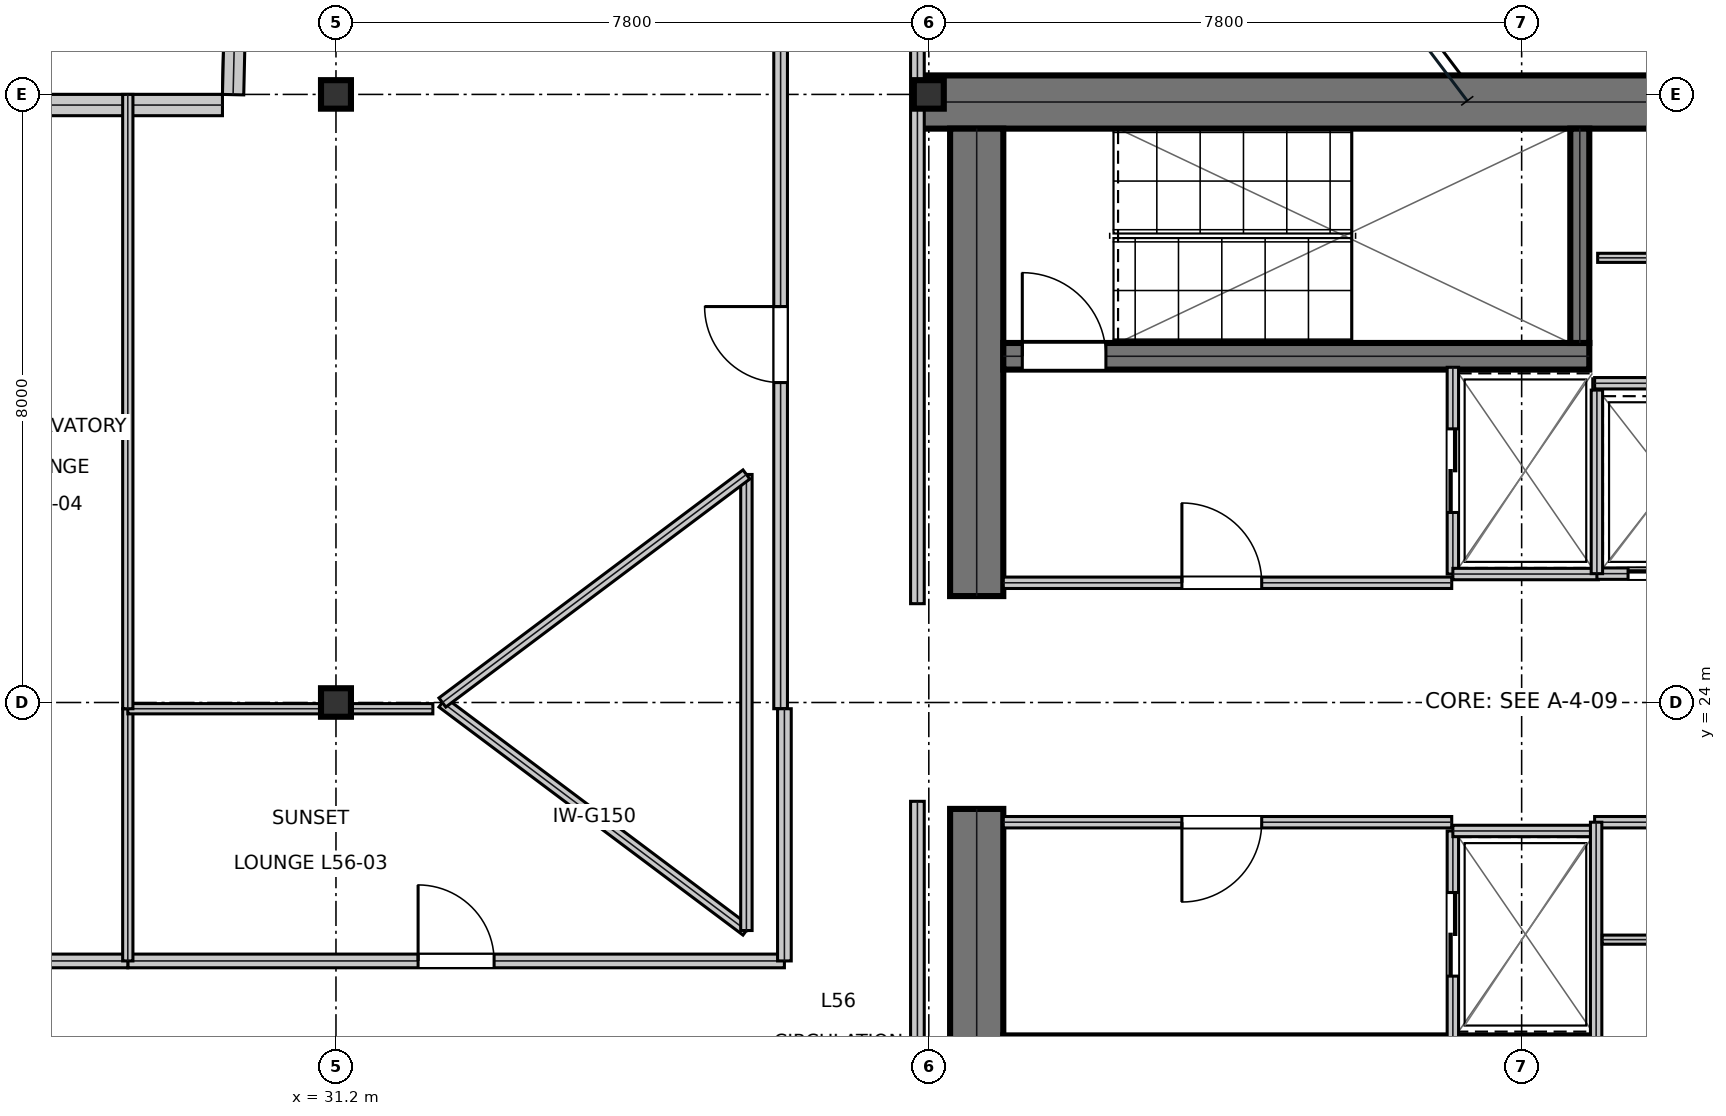
"""IFC4 building model, lengths in metres.
Left out: names, types, materials, properties, quantities, classifications, styles, units other than length and angle.
Written with IfcOpenShell. Run it as: python <this file> out.ifc"""

import sys

from ifc_helpers import new_model, si_unit, direction, frame, frame_2d, origin, origin_2d, place, context, subcontext, project, spatial, rectangle, i_section, extrude, element, fill, save


model = new_model("IFC4")
c1 = context("Model", 3, precision=1e-05, world=origin(), true_north=direction((0.0, 1.0)))
c2 = subcontext(c1, "Body", "Model", "MODEL_VIEW")
j1 = project(units=[si_unit("LENGTHUNIT", "METRE"), si_unit("PLANEANGLEUNIT", "RADIAN")], contexts=[c1])
p1 = place(None, origin())
s1 = spatial("IfcSite", under=j1, at=p1, CompositionType="ELEMENT")
p2 = place(p1, origin())
s2 = spatial("IfcBuilding", under=s1, at=p2, CompositionType="ELEMENT")
p3 = place(p2, frame((0.0, 0.0, 240.45)))
s3 = spatial("IfcBuildingStorey", under=s2, at=p3, CompositionType="ELEMENT", Elevation=240.45)
p4 = place(p3, frame((38.8, 31.9, 0.0), z_axis=(0.0, 0.0, 1.0), x_axis=(1.0, 0.0, 0.0)))
e1 = element("IfcWall", 1, at=p4, inside=s3, PredefinedType="SHEAR", context=c2, shape_type="SweptSolid", body=[
    extrude(rectangle(XDim=16.0, YDim=0.7, at=frame_2d((8.0, 0.0))), origin(), (0.0, 0.0, 1.0), 3.79),
])
for number, where, z_axis, x_axis in (
    (2, (39.63, 16.45, 0.0), (0.0, 0.0, 1.0), (0.0, 1.0, 0.0)),
    (3, (39.63, 25.4, 0.0), (0.0, 0.0, 1.0), (0.0, 1.0, 0.0)),
):
    element("IfcWall", number, at=place(p3, frame(where, z_axis=z_axis, x_axis=x_axis)), inside=s3, PredefinedType="SHEAR", context=c2, shape_type="SweptSolid", body=[
        extrude(rectangle(XDim=6.15, YDim=0.7, at=frame_2d((3.075, 0.0))), origin(), (0.0, 0.0, 1.0), 3.79),
    ])
p5 = place(p3, frame((39.98, 28.555, 0.0), z_axis=(0.0, 0.0, 1.0), x_axis=(1.0, 0.0, 0.0)))
e4 = element("IfcWall", 4, at=p5, inside=s3, PredefinedType="SHEAR", context=c2, shape_type="SweptSolid", body=[
    extrude(rectangle(XDim=7.71, YDim=0.35, at=frame_2d((3.855, 0.0))), origin(), (0.0, 0.0, 1.0), 3.79),
])
p6 = place(p5, frame((0.25, 0.0, 0.0)))
e5 = element("IfcOpeningElement", 5, at=p6, cuts=e4, PredefinedType="OPENING", context=c2, shape_type="SweptSolid", body=[
    extrude(rectangle(XDim=1.1, YDim=2.15, at=frame_2d((0.55, 1.075))), frame((0.0, 0.185, 0.0), z_axis=(0.0, -1.0, 0.0), x_axis=(1.0, 0.0, 0.0)), (0.0, 0.0, 1.0), 0.37),
])
p7 = place(p3, frame((39.98, 19.445, 0.0), z_axis=(0.0, 0.0, 1.0), x_axis=(1.0, 0.0, 0.0)))
e6 = element("IfcWall", 6, at=p7, inside=s3, PredefinedType="SHEAR", context=c2, shape_type="SweptSolid", body=[
    extrude(rectangle(XDim=7.71, YDim=0.35, at=frame_2d((3.855, 0.0))), origin(), (0.0, 0.0, 1.0), 3.79),
])
p8 = place(p7, frame((0.25, 0.0, 0.0)))
e7 = element("IfcOpeningElement", 7, at=p8, cuts=e6, PredefinedType="OPENING", context=c2, shape_type="SweptSolid", body=[
    extrude(rectangle(XDim=1.1, YDim=2.15, at=frame_2d((0.55, 1.075))), frame((0.0, 0.185, 0.0), z_axis=(0.0, -1.0, 0.0), x_axis=(1.0, 0.0, 0.0)), (0.0, 0.0, 1.0), 0.37),
])
p9 = place(p3, frame((47.565, 28.73, 0.0), z_axis=(0.0, 0.0, 1.0), x_axis=(0.0, 1.0, 0.0)))
e8 = element("IfcWall", 8, at=p9, inside=s3, PredefinedType="SHEAR", context=c2, shape_type="SweptSolid", body=[
    extrude(rectangle(XDim=2.82, YDim=0.25, at=frame_2d((1.41, 0.0))), origin(), (0.0, 0.0, 1.0), 3.79),
])
for number, where, z_axis, x_axis in (
    (9, (31.2, 24.0, 0.0), (0.0, 0.0, 1.0), (1.0, 0.0, 0.0)),
    (10, (31.2, 32.0, 0.0), (0.0, 0.0, 1.0), (1.0, 0.0, 0.0)),
    (11, (39.0, 32.0, 0.0), (0.0, 0.0, 1.0), (1.0, 0.0, 0.0)),
):
    element("IfcColumn", number, at=place(p3, frame(where, z_axis=z_axis, x_axis=x_axis)), inside=s3, PredefinedType="COLUMN", context=c2, shape_type="SweptSolid", body=[
        extrude(i_section(OverallWidth=0.394, OverallDepth=0.375, WebThickness=0.017, FlangeThickness=0.028, at=origin_2d()), origin(), (0.0, 0.0, 1.0), 4.044),
    ])
p10 = place(p3, frame((30.007, 38.938, 0.0), z_axis=(0.0, 0.0, 1.0), x_axis=(-0.023173514979, -0.999731458044, 0.0)))
e12 = element("IfcWall", 12, at=p10, inside=s3, PredefinedType="STANDARD", context=c2, shape_type="SweptSolid", body=[
    extrude(rectangle(XDim=6.943, YDim=0.28, at=frame_2d((3.471, 0.0))), origin(), (0.0, 0.0, 1.0), 3.79),
])
p11 = place(p3, frame((29.707, 31.86, 0.0), z_axis=(0.0, 0.0, 1.0), x_axis=(-1.0, 0.0, 0.0)))
e13 = element("IfcWall", 13, at=p11, inside=s3, PredefinedType="STANDARD", context=c2, shape_type="SweptSolid", body=[
    extrude(rectangle(XDim=2.819, YDim=0.28, at=frame_2d((1.409, 0.0))), origin(), (0.0, 0.0, 1.0), 3.79),
])
p12 = place(p3, frame((39.98, 25.575, 0.0), z_axis=(0.0, 0.0, 1.0), x_axis=(1.0, 0.0, 0.0)))
e14 = element("IfcWall", 14, at=p12, inside=s3, PredefinedType="PARTITIONING", context=c2, shape_type="SweptSolid", body=[
    extrude(rectangle(XDim=5.9, YDim=0.15, at=frame_2d((2.95, 0.0))), origin(), (0.0, 0.0, 1.0), 3.79),
])
p13 = place(p12, frame((2.35, 0.0, 0.0)))
e15 = element("IfcOpeningElement", 15, at=p13, cuts=e14, PredefinedType="OPENING", context=c2, shape_type="SweptSolid", body=[
    extrude(rectangle(XDim=1.05, YDim=2.15, at=frame_2d((0.525, 1.075))), frame((0.0, 0.085, 0.0), z_axis=(0.0, -1.0, 0.0), x_axis=(1.0, 0.0, 0.0)), (0.0, 0.0, 1.0), 0.17),
])
p14 = place(p3, frame((39.98, 22.425, 0.0), z_axis=(0.0, 0.0, 1.0), x_axis=(1.0, 0.0, 0.0)))
e16 = element("IfcWall", 16, at=p14, inside=s3, PredefinedType="PARTITIONING", context=c2, shape_type="SweptSolid", body=[
    extrude(rectangle(XDim=5.9, YDim=0.15, at=frame_2d((2.95, 0.0))), origin(), (0.0, 0.0, 1.0), 3.79),
])
p15 = place(p14, frame((2.35, 0.0, 0.0)))
e17 = element("IfcOpeningElement", 17, at=p15, cuts=e16, PredefinedType="OPENING", context=c2, shape_type="SweptSolid", body=[
    extrude(rectangle(XDim=1.05, YDim=2.15, at=frame_2d((0.525, 1.075))), frame((0.0, 0.085, 0.0), z_axis=(0.0, -1.0, 0.0), x_axis=(1.0, 0.0, 0.0)), (0.0, 0.0, 1.0), 0.17),
])
p16 = place(p3, frame((45.895, 25.69, 0.0), z_axis=(0.0, 0.0, 1.0), x_axis=(0.0, 1.0, 0.0)))
e18 = element("IfcWall", 18, at=p16, inside=s3, PredefinedType="PARTITIONING", context=c2, shape_type="SweptSolid", body=[
    extrude(rectangle(XDim=2.72, YDim=0.15, at=frame_2d((1.36, 0.0))), origin(), (0.0, 0.0, 1.0), 3.79),
])
p17 = place(p16, frame((0.81, 0.0, 0.0)))
e19 = element("IfcOpeningElement", 19, at=p17, cuts=e18, PredefinedType="OPENING", context=c2, shape_type="SweptSolid", body=[
    extrude(rectangle(XDim=1.1, YDim=2.15, at=frame_2d((0.55, 1.075))), frame((0.0, 0.085, 0.0), z_axis=(0.0, -1.0, 0.0), x_axis=(1.0, 0.0, 0.0)), (0.0, 0.0, 1.0), 0.17),
])
p18 = place(p3, frame((45.895, 25.69, 0.0), z_axis=(0.0, 0.0, 1.0), x_axis=(1.0, 0.0, 0.0)))
e20 = element("IfcWall", 20, at=p18, inside=s3, PredefinedType="PARTITIONING", context=c2, shape_type="SweptSolid", body=[
    extrude(rectangle(XDim=1.915, YDim=0.15, at=frame_2d((0.958, 0.0))), origin(), (0.0, 0.0, 1.0), 3.79),
])
p19 = place(p3, frame((45.895, 19.59, 0.0), z_axis=(0.0, 0.0, 1.0), x_axis=(0.0, 1.0, 0.0)))
e21 = element("IfcWall", 21, at=p19, inside=s3, PredefinedType="PARTITIONING", context=c2, shape_type="SweptSolid", body=[
    extrude(rectangle(XDim=2.72, YDim=0.15, at=frame_2d((1.36, 0.0))), origin(), (0.0, 0.0, 1.0), 3.79),
])
p20 = place(p19, frame((0.81, 0.0, 0.0)))
e22 = element("IfcOpeningElement", 22, at=p20, cuts=e21, PredefinedType="OPENING", context=c2, shape_type="SweptSolid", body=[
    extrude(rectangle(XDim=1.1, YDim=2.15, at=frame_2d((0.55, 1.075))), frame((0.0, 0.085, 0.0), z_axis=(0.0, -1.0, 0.0), x_axis=(1.0, 0.0, 0.0)), (0.0, 0.0, 1.0), 0.17),
])
p21 = place(p3, frame((45.895, 22.31, 0.0), z_axis=(0.0, 0.0, 1.0), x_axis=(1.0, 0.0, 0.0)))
e23 = element("IfcWall", 23, at=p21, inside=s3, PredefinedType="PARTITIONING", context=c2, shape_type="SweptSolid", body=[
    extrude(rectangle(XDim=1.915, YDim=0.15, at=frame_2d((0.958, 0.0))), origin(), (0.0, 0.0, 1.0), 3.79),
])
p22 = place(p3, frame((47.79, 25.695, 0.0), z_axis=(0.0, 0.0, 1.0), x_axis=(1.0, 0.0, 0.0)))
e24 = element("IfcWall", 24, at=p22, inside=s3, PredefinedType="PARTITIONING", context=c2, shape_type="SweptSolid", body=[
    extrude(rectangle(XDim=1.92, YDim=0.15, at=frame_2d((0.96, 0.0))), origin(), (0.0, 0.0, 1.0), 3.79),
])
p23 = place(p22, frame((0.41, 0.0, 0.0)))
e25 = element("IfcOpeningElement", 25, at=p23, cuts=e24, PredefinedType="OPENING", context=c2, shape_type="SweptSolid", body=[
    extrude(rectangle(XDim=1.1, YDim=2.15, at=frame_2d((0.55, 1.075))), frame((0.0, 0.085, 0.0), z_axis=(0.0, -1.0, 0.0), x_axis=(1.0, 0.0, 0.0)), (0.0, 0.0, 1.0), 0.17),
])
p24 = place(p3, frame((47.79, 25.695, 0.0), z_axis=(0.0, 0.0, 1.0), x_axis=(0.0, 1.0, 0.0)))
e26 = element("IfcWall", 26, at=p24, inside=s3, PredefinedType="PARTITIONING", context=c2, shape_type="SweptSolid", body=[
    extrude(rectangle(XDim=2.415, YDim=0.15, at=frame_2d((1.208, 0.0))), origin(), (0.0, 0.0, 1.0), 3.79),
])
p25 = place(p3, frame((47.76, 22.425, 0.0), z_axis=(0.0, 0.0, 1.0), x_axis=(1.0, 0.0, 0.0)))
e27 = element("IfcWall", 27, at=p25, inside=s3, PredefinedType="PARTITIONING", context=c2, shape_type="SweptSolid", body=[
    extrude(rectangle(XDim=1.96, YDim=0.15, at=frame_2d((0.98, 0.0))), origin(), (0.0, 0.0, 1.0), 3.79),
])
p26 = place(p3, frame((47.78, 16.45, 0.0), z_axis=(0.0, 0.0, 1.0), x_axis=(0.0, 1.0, 0.0)))
e28 = element("IfcWall", 28, at=p26, inside=s3, PredefinedType="PARTITIONING", context=c2, shape_type="SweptSolid", body=[
    extrude(rectangle(XDim=5.975, YDim=0.15, at=frame_2d((2.988, 0.0))), origin(), (0.0, 0.0, 1.0), 3.79),
])
p27 = place(p3, frame((47.86, 20.88, 0.0), z_axis=(0.0, 0.0, 1.0), x_axis=(1.0, 0.0, 0.0)))
e29 = element("IfcWall", 29, at=p27, inside=s3, PredefinedType="PARTITIONING", context=c2, shape_type="SweptSolid", body=[
    extrude(rectangle(XDim=1.76, YDim=0.12, at=frame_2d((0.88, 0.0))), origin(), (0.0, 0.0, 1.0), 3.79),
])
p28 = place(p3, frame((47.76, 28.2, 0.0), z_axis=(0.0, 0.0, 1.0), x_axis=(1.0, 0.0, 0.0)))
e30 = element("IfcWall", 30, at=p28, inside=s3, PredefinedType="PARTITIONING", context=c2, shape_type="SweptSolid", body=[
    extrude(rectangle(XDim=2.04, YDim=0.15, at=frame_2d((1.02, 0.0))), origin(), (0.0, 0.0, 1.0), 3.79),
])
p29 = place(p3, frame((47.8, 29.85, 0.0), z_axis=(0.0, 0.0, 1.0), x_axis=(1.0, 0.0, 0.0)))
e31 = element("IfcWall", 31, at=p29, inside=s3, PredefinedType="PARTITIONING", context=c2, shape_type="SweptSolid", body=[
    extrude(rectangle(XDim=5.86, YDim=0.12, at=frame_2d((2.93, 0.0))), origin(), (0.0, 0.0, 1.0), 3.79),
])
p30 = place(p29, frame((2.6, 0.0, 0.0)))
e32 = element("IfcOpeningElement", 32, at=p30, cuts=e31, PredefinedType="OPENING", context=c2, shape_type="SweptSolid", body=[
    extrude(rectangle(XDim=0.85, YDim=2.15, at=frame_2d((0.425, 1.075))), frame((0.0, 0.07, 0.0), z_axis=(0.0, -1.0, 0.0), x_axis=(1.0, 0.0, 0.0)), (0.0, 0.0, 1.0), 0.14),
])
p31 = place(p3, frame((28.461, 20.6, 0.0), z_axis=(0.0, 0.0, 1.0), x_axis=(1.0, 0.0, 0.0)))
e33 = element("IfcWall", 33, at=p31, inside=s3, PredefinedType="SOLIDWALL", context=c2, shape_type="SweptSolid", body=[
    extrude(rectangle(XDim=8.639, YDim=0.18, at=frame_2d((4.32, 0.0))), origin(), (0.0, 0.0, 1.0), 3.241),
])
p32 = place(p31, frame((3.82, 0.0, 0.0)))
e34 = element("IfcOpeningElement", 34, at=p32, cuts=e33, PredefinedType="OPENING", context=c2, shape_type="SweptSolid", body=[
    extrude(rectangle(XDim=1.0, YDim=2.15, at=frame_2d((0.5, 1.075))), frame((0.0, 0.1, 0.0), z_axis=(0.0, -1.0, 0.0), x_axis=(1.0, 0.0, 0.0)), (0.0, 0.0, 1.0), 0.2),
])
p33 = place(p3, frame((37.05, 23.918, 0.0), z_axis=(0.0, 0.0, 1.0), x_axis=(0.0, 1.0, 0.0)))
e35 = element("IfcWall", 35, at=p33, inside=s3, PredefinedType="SOLIDWALL", context=c2, shape_type="SweptSolid", body=[
    extrude(rectangle(XDim=9.582, YDim=0.18, at=frame_2d((4.791, 0.0))), origin(), (0.0, 0.0, 1.0), 3.241),
])
p34 = place(p33, frame((4.291, 0.0, 0.0)))
e36 = element("IfcOpeningElement", 36, at=p34, cuts=e35, PredefinedType="OPENING", context=c2, shape_type="SweptSolid", body=[
    extrude(rectangle(XDim=1.0, YDim=2.15, at=frame_2d((0.5, 1.075))), frame((0.0, 0.1, 0.0), z_axis=(0.0, -1.0, 0.0), x_axis=(1.0, 0.0, 0.0)), (0.0, 0.0, 1.0), 0.2),
])
p35 = place(p3, frame((38.85, 18.8, 0.0), z_axis=(0.0, 0.0, 1.0), x_axis=(0.0, 1.0, 0.0)))
e37 = element("IfcWall", 37, at=p35, inside=s3, PredefinedType="SOLIDWALL", context=c2, shape_type="SweptSolid", body=[
    extrude(rectangle(XDim=3.9, YDim=0.18, at=frame_2d((1.95, 0.0))), origin(), (0.0, 0.0, 1.0), 3.468),
])
p36 = place(p3, frame((37.1, 20.6, 0.0), z_axis=(0.0, 0.0, 1.0), x_axis=(0.0, 1.0, 0.0)))
e38 = element("IfcWall", 38, at=p36, inside=s3, PredefinedType="SOLIDWALL", context=c2, shape_type="SweptSolid", body=[
    extrude(rectangle(XDim=3.318, YDim=0.18, at=frame_2d((1.659, 0.0))), origin(), (0.0, 0.0, 1.0), 3.79),
])
p37 = place(p3, frame((26.4, 20.6, 0.0), z_axis=(0.0, 0.0, 1.0), x_axis=(1.0, 0.0, 0.0)))
e39 = element("IfcWall", 39, at=p37, inside=s3, PredefinedType="SOLIDWALL", context=c2, shape_type="SweptSolid", body=[
    extrude(rectangle(XDim=2.061, YDim=0.18, at=frame_2d((1.031, 0.0))), origin(), (0.0, 0.0, 1.0), 3.79),
])
p38 = place(p3, frame((38.85, 25.3, 0.0), z_axis=(0.0, 0.0, 1.0), x_axis=(0.0, 1.0, 0.0)))
e40 = element("IfcWall", 40, at=p38, inside=s3, PredefinedType="SOLIDWALL", context=c2, shape_type="SweptSolid", body=[
    extrude(rectangle(XDim=8.2, YDim=0.18, at=frame_2d((4.1, 0.0))), origin(), (0.0, 0.0, 1.0), 3.241),
])
p39 = place(p3, frame((28.461, 20.6, 0.0), z_axis=(0.0, 0.0, 1.0), x_axis=(0.0, 1.0, 0.0)))
e41 = element("IfcWall", 41, at=p39, inside=s3, PredefinedType="PARTITIONING", context=c2, shape_type="SweptSolid", body=[
    extrude(rectangle(XDim=3.318, YDim=0.135, at=frame_2d((1.659, 0.0))), origin(), (0.0, 0.0, 1.0), 3.241),
])
p40 = place(p3, frame((28.461, 23.918, 0.0), z_axis=(0.0, 0.0, 1.0), x_axis=(1.0, 0.0, 0.0)))
e42 = element("IfcWall", 42, at=p40, inside=s3, PredefinedType="PARTITIONING", context=c2, shape_type="SweptSolid", body=[
    extrude(rectangle(XDim=4.014, YDim=0.135, at=frame_2d((2.007, 0.0))), origin(), (0.0, 0.0, 1.0), 3.241),
])
p41 = place(p3, frame((28.461, 23.918, 0.0), z_axis=(0.0, 0.0, 1.0), x_axis=(0.0, 1.0, 0.0)))
e43 = element("IfcWall", 43, at=p41, inside=s3, PredefinedType="PARTITIONING", context=c2, shape_type="SweptSolid", body=[
    extrude(rectangle(XDim=8.082, YDim=0.135, at=frame_2d((4.041, 0.0))), origin(), (0.0, 0.0, 1.0), 3.241),
])
p42 = place(p3, frame((32.6, 24.0, 0.0), z_axis=(0.0, 0.0, 1.0), x_axis=(0.8, -0.6, 0.0)))
e44 = element("IfcWall", 44, at=p42, inside=s3, PredefinedType="MOVABLE", context=c2, shape_type="SweptSolid", body=[
    extrude(rectangle(XDim=5.0, YDim=0.15, at=frame_2d((2.5, 0.0))), origin(), (0.0, 0.0, 1.0), 3.79),
])
p43 = place(p3, frame((36.6, 21.0, 0.0), z_axis=(0.0, 0.0, 1.0), x_axis=(0.0, 1.0, 0.0)))
e45 = element("IfcWall", 45, at=p43, inside=s3, PredefinedType="MOVABLE", context=c2, shape_type="SweptSolid", body=[
    extrude(rectangle(XDim=6.0, YDim=0.15, at=frame_2d((3.0, 0.0))), origin(), (0.0, 0.0, 1.0), 3.79),
])
p44 = place(p3, frame((36.6, 27.0, 0.0), z_axis=(0.0, 0.0, 1.0), x_axis=(-0.8, -0.6, 0.0)))
e46 = element("IfcWall", 46, at=p44, inside=s3, PredefinedType="MOVABLE", context=c2, shape_type="SweptSolid", body=[
    extrude(rectangle(XDim=5.0, YDim=0.15, at=frame_2d((2.5, 0.0))), origin(), (0.0, 0.0, 1.0), 3.79),
])
p45 = place(p13, origin())
e47 = element("IfcDoor", 47, at=p45, inside=s3, OperationType="SINGLE_SWING_LEFT", PredefinedType="DOOR", context=c2, shape_type="SweptSolid", body=[
    extrude(rectangle(XDim=1.05, YDim=2.15, at=frame_2d((0.525, 1.075))), frame((0.0, 0.025, 0.0), z_axis=(0.0, -1.0, 0.0), x_axis=(1.0, 0.0, 0.0)), (0.0, 0.0, 1.0), 0.05),
])
fill(e15, e47)
p46 = place(p15, frame((1.05, 0.0, 0.0), z_axis=(0.0, 0.0, 1.0), x_axis=(-1.0, 0.0, 0.0)))
e48 = element("IfcDoor", 48, at=p46, inside=s3, OperationType="SINGLE_SWING_RIGHT", PredefinedType="DOOR", context=c2, shape_type="SweptSolid", body=[
    extrude(rectangle(XDim=1.05, YDim=2.15, at=frame_2d((0.525, 1.075))), frame((0.0, 0.025, 0.0), z_axis=(0.0, -1.0, 0.0), x_axis=(1.0, 0.0, 0.0)), (0.0, 0.0, 1.0), 0.05),
])
fill(e17, e48)
p47 = place(p17, frame((1.1, 0.0, 0.0), z_axis=(0.0, 0.0, 1.0), x_axis=(-1.0, 0.0, 0.0)))
e49 = element("IfcDoor", 49, at=p47, inside=s3, OperationType="DOUBLE_DOOR_SLIDING", PredefinedType="DOOR", context=c2, shape_type="SweptSolid", body=[
    extrude(rectangle(XDim=1.1, YDim=2.15, at=frame_2d((0.55, 1.075))), frame((0.0, 0.025, 0.0), z_axis=(0.0, -1.0, 0.0), x_axis=(1.0, 0.0, 0.0)), (0.0, 0.0, 1.0), 0.05),
])
fill(e19, e49)
p48 = place(p20, frame((1.1, 0.0, 0.0), z_axis=(0.0, 0.0, 1.0), x_axis=(-1.0, 0.0, 0.0)))
e50 = element("IfcDoor", 50, at=p48, inside=s3, OperationType="DOUBLE_DOOR_SLIDING", PredefinedType="DOOR", context=c2, shape_type="SweptSolid", body=[
    extrude(rectangle(XDim=1.1, YDim=2.15, at=frame_2d((0.55, 1.075))), frame((0.0, 0.025, 0.0), z_axis=(0.0, -1.0, 0.0), x_axis=(1.0, 0.0, 0.0)), (0.0, 0.0, 1.0), 0.05),
])
fill(e22, e50)
p49 = place(p23, frame((1.1, 0.0, 0.0), z_axis=(0.0, 0.0, 1.0), x_axis=(-1.0, 0.0, 0.0)))
e51 = element("IfcDoor", 51, at=p49, inside=s3, OperationType="DOUBLE_DOOR_SLIDING", PredefinedType="DOOR", context=c2, shape_type="SweptSolid", body=[
    extrude(rectangle(XDim=1.1, YDim=2.15, at=frame_2d((0.55, 1.075))), frame((0.0, 0.025, 0.0), z_axis=(0.0, -1.0, 0.0), x_axis=(1.0, 0.0, 0.0)), (0.0, 0.0, 1.0), 0.05),
])
fill(e25, e51)
p50 = place(p32, origin())
e52 = element("IfcDoor", 52, at=p50, inside=s3, OperationType="SINGLE_SWING_LEFT", PredefinedType="DOOR", context=c2, shape_type="SweptSolid", body=[
    extrude(rectangle(XDim=1.0, YDim=2.15, at=frame_2d((0.5, 1.075))), frame((0.0, 0.025, 0.0), z_axis=(0.0, -1.0, 0.0), x_axis=(1.0, 0.0, 0.0)), (0.0, 0.0, 1.0), 0.05),
])
fill(e34, e52)
p51 = place(p34, origin())
e53 = element("IfcDoor", 53, at=p51, inside=s3, OperationType="SINGLE_SWING_RIGHT", PredefinedType="DOOR", context=c2, shape_type="SweptSolid", body=[
    extrude(rectangle(XDim=1.0, YDim=2.15, at=frame_2d((0.5, 1.075))), frame((0.0, 0.025, 0.0), z_axis=(0.0, -1.0, 0.0), x_axis=(1.0, 0.0, 0.0)), (0.0, 0.0, 1.0), 0.05),
])
fill(e36, e53)
p52 = place(p6, origin())
e54 = element("IfcDoor", 54, at=p52, inside=s3, OperationType="SINGLE_SWING_LEFT", PredefinedType="DOOR", context=c2, shape_type="SweptSolid", body=[
    extrude(rectangle(XDim=1.1, YDim=2.15, at=frame_2d((0.55, 1.075))), frame((0.0, 0.025, 0.0), z_axis=(0.0, -1.0, 0.0), x_axis=(1.0, 0.0, 0.0)), (0.0, 0.0, 1.0), 0.05),
])
fill(e5, e54)
save(model, sys.argv[1])
